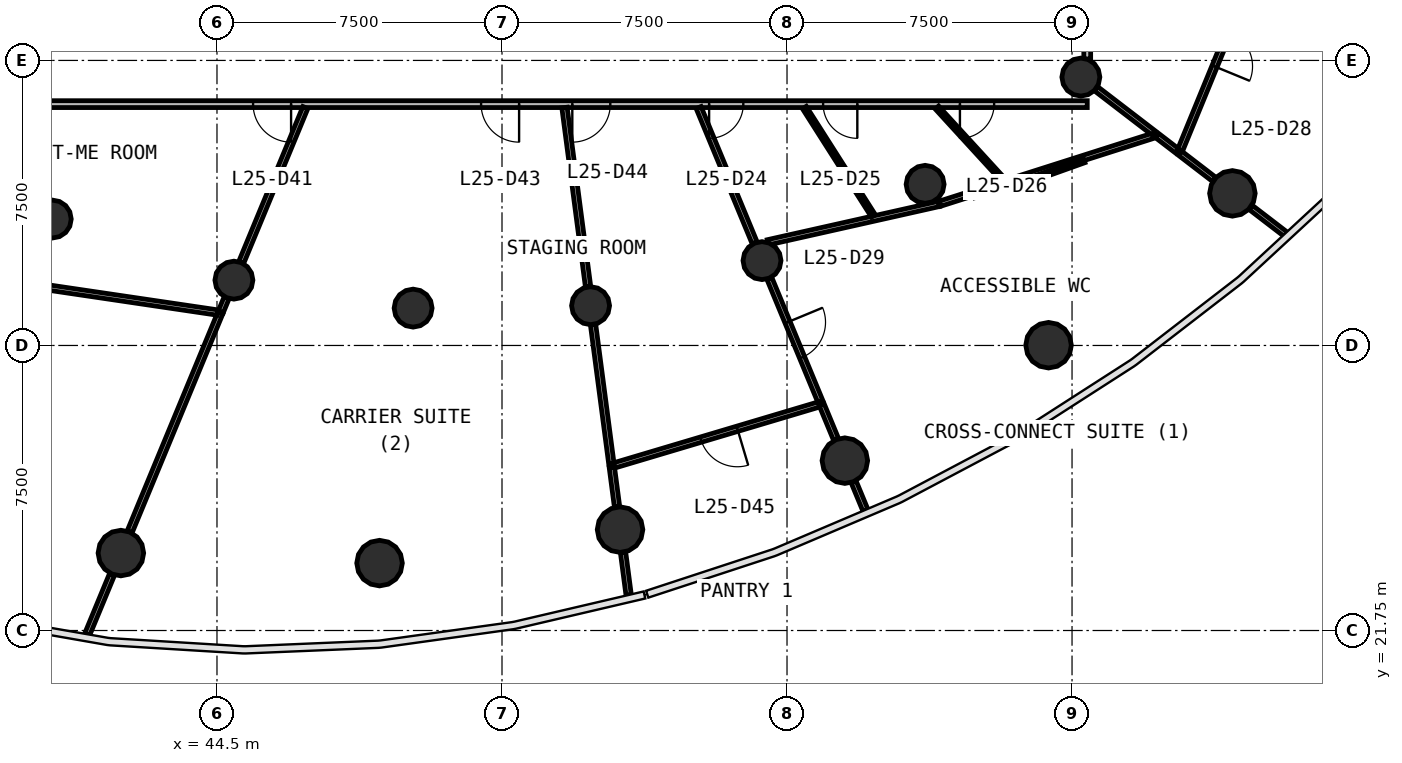
"""IFC4 building model, lengths in metres.
Left out: names, types, materials, properties, quantities, classifications, styles, units other than length and angle.
Written with IfcOpenShell. Run it as: python <this file> out.ifc"""

import sys

from ifc_helpers import new_model, si_unit, direction, frame, frame_2d, origin, origin_2d, place, context, subcontext, project, spatial, rectangle, circle, extrude, source, transform, mapped, element, fill, save


model = new_model("IFC4")
c1 = context("Model", 3, precision=1e-05, world=origin(), true_north=direction((0.0, 1.0)))
c2 = subcontext(c1, "Body", "Model", "MODEL_VIEW")
j1 = project(units=[si_unit("LENGTHUNIT", "METRE"), si_unit("PLANEANGLEUNIT", "RADIAN")], contexts=[c1])
p1 = place(None, origin())
s1 = spatial("IfcSite", under=j1, at=p1, CompositionType="ELEMENT")
p2 = place(p1, origin())
s2 = spatial("IfcBuilding", under=s1, at=p2, CompositionType="ELEMENT")
p3 = place(p2, frame((0.0, 0.0, 108.5)))
s3 = spatial("IfcBuildingStorey", under=s2, at=p3, CompositionType="ELEMENT", Elevation=108.5)
m1 = source(origin(), c2, "Body", "SweptSolid", [
    extrude(circle(Radius=0.6, at=origin_2d()), origin(), (0.0, 0.0, 1.0), 4.1),
])
for number, where, z_axis, x_axis in (
    (1, (41.971, 23.788, 0.0), (0.0, 0.0, 1.0), (1.0, 0.0, 0.0)),
    (2, (48.778, 23.523, 0.0), (0.0, 0.0, 1.0), (1.0, 0.0, 0.0)),
    (3, (55.106, 24.405, 0.0), (0.0, 0.0, 1.0), (1.0, 0.0, 0.0)),
    (4, (61.022, 26.219, 0.0), (0.0, 0.0, 1.0), (1.0, 0.0, 0.0)),
    (5, (66.382, 29.257, 0.0), (0.0, 0.0, 1.0), (1.0, 0.0, 0.0)),
    (6, (71.22, 33.252, 0.0), (0.0, 0.0, 1.0), (1.0, 0.0, 0.0)),
):
    element("IfcColumn", number, at=place(p3, frame(where, z_axis=z_axis, x_axis=x_axis)), inside=s3, PredefinedType="COLUMN", context=c2, shape_type="MappedRepresentation", body=[
        mapped(m1, transform((0.0, 0.0, 0.0), scale=1.0)),
    ])
m2 = source(origin(), c2, "Body", "SweptSolid", [
    extrude(circle(Radius=0.5, at=origin_2d()), origin(), (0.0, 0.0, 1.0), 4.1),
])
for number, where, z_axis, x_axis in (
    (7, (40.165, 32.576, 0.0), (0.0, 0.0, 1.0), (1.0, 0.0, 0.0)),
    (8, (44.945, 30.969, 0.0), (0.0, 0.0, 1.0), (1.0, 0.0, 0.0)),
    (9, (49.661, 30.233, 0.0), (0.0, 0.0, 1.0), (1.0, 0.0, 0.0)),
    (10, (54.331, 30.297, 0.0), (0.0, 0.0, 1.0), (1.0, 0.0, 0.0)),
    (11, (58.842, 31.482, 0.0), (0.0, 0.0, 1.0), (1.0, 0.0, 0.0)),
    (12, (63.134, 33.49, 0.0), (0.0, 0.0, 1.0), (1.0, 0.0, 0.0)),
    (13, (67.232, 36.312, 0.0), (0.0, 0.0, 1.0), (1.0, 0.0, 0.0)),
):
    element("IfcColumn", number, at=place(p3, frame(where, z_axis=z_axis, x_axis=x_axis)), inside=s3, PredefinedType="COLUMN", context=c2, shape_type="MappedRepresentation", body=[
        mapped(m2, transform((0.0, 0.0, 0.0), scale=1.0)),
    ])
p4 = place(p3, frame((67.4, 35.6, 0.0), z_axis=(0.0, 0.0, 1.0), x_axis=(-1.0, 0.0, 0.0)))
e14 = element("IfcWall", 14, at=p4, inside=s3, PredefinedType="PARTITIONING", context=c2, shape_type="SweptSolid", body=[
    extrude(rectangle(XDim=30.8, YDim=0.18, at=frame_2d((15.4, 0.0))), origin(), (0.0, 0.0, 1.0), 2.9),
])
p5 = place(p4, frame((9.05, 0.0, 0.0)))
e15 = element("IfcOpeningElement", 15, at=p5, cuts=e14, PredefinedType="OPENING", context=c2, shape_type="SweptSolid", body=[
    extrude(rectangle(XDim=0.9, YDim=2.1, at=frame_2d((0.45, 1.05))), frame((0.0, 0.1, 0.0), z_axis=(0.0, -1.0, 0.0), x_axis=(1.0, 0.0, 0.0)), (0.0, 0.0, 1.0), 0.2),
])
p6 = place(p4, frame((6.05, 0.0, 0.0)))
e16 = element("IfcOpeningElement", 16, at=p6, cuts=e14, PredefinedType="OPENING", context=c2, shape_type="SweptSolid", body=[
    extrude(rectangle(XDim=0.9, YDim=2.1, at=frame_2d((0.45, 1.05))), frame((0.0, 0.1, 0.0), z_axis=(0.0, -1.0, 0.0), x_axis=(1.0, 0.0, 0.0)), (0.0, 0.0, 1.0), 0.2),
])
p7 = place(p4, frame((2.45, 0.0, 0.0)))
e17 = element("IfcOpeningElement", 17, at=p7, cuts=e14, PredefinedType="OPENING", context=c2, shape_type="SweptSolid", body=[
    extrude(rectangle(XDim=0.9, YDim=2.1, at=frame_2d((0.45, 1.05))), frame((0.0, 0.1, 0.0), z_axis=(0.0, -1.0, 0.0), x_axis=(1.0, 0.0, 0.0)), (0.0, 0.0, 1.0), 0.2),
])
p8 = place(p4, frame((20.95, 0.0, 0.0)))
e18 = element("IfcOpeningElement", 18, at=p8, cuts=e14, PredefinedType="OPENING", context=c2, shape_type="SweptSolid", body=[
    extrude(rectangle(XDim=1.0, YDim=2.1, at=frame_2d((0.5, 1.05))), frame((0.0, 0.1, 0.0), z_axis=(0.0, -1.0, 0.0), x_axis=(1.0, 0.0, 0.0)), (0.0, 0.0, 1.0), 0.2),
])
p9 = place(p4, frame((14.95, 0.0, 0.0)))
e19 = element("IfcOpeningElement", 19, at=p9, cuts=e14, PredefinedType="OPENING", context=c2, shape_type="SweptSolid", body=[
    extrude(rectangle(XDim=1.0, YDim=2.1, at=frame_2d((0.5, 1.05))), frame((0.0, 0.1, 0.0), z_axis=(0.0, -1.0, 0.0), x_axis=(1.0, 0.0, 0.0)), (0.0, 0.0, 1.0), 0.2),
])
p10 = place(p4, frame((12.55, 0.0, 0.0)))
e20 = element("IfcOpeningElement", 20, at=p10, cuts=e14, PredefinedType="OPENING", context=c2, shape_type="SweptSolid", body=[
    extrude(rectangle(XDim=1.0, YDim=2.1, at=frame_2d((0.5, 1.05))), frame((0.0, 0.1, 0.0), z_axis=(0.0, -1.0, 0.0), x_axis=(1.0, 0.0, 0.0)), (0.0, 0.0, 1.0), 0.2),
])
p11 = place(p3, frame((67.4, 60.37, 0.0), z_axis=(0.0, 0.0, 1.0), x_axis=(0.0, -1.0, 0.0)))
e21 = element("IfcWall", 21, at=p11, inside=s3, PredefinedType="PARTITIONING", context=c2, shape_type="SweptSolid", body=[
    extrude(rectangle(XDim=23.583, YDim=0.18, at=frame_2d((11.791, 0.0))), origin(), (0.0, 0.0, 1.0), 2.9),
])
p12 = place(p11, frame((14.732, 0.0, 0.0)))
e22 = element("IfcOpeningElement", 22, at=p12, cuts=e21, PredefinedType="OPENING", context=c2, shape_type="SweptSolid", body=[
    extrude(rectangle(XDim=1.0, YDim=2.1, at=frame_2d((0.5, 1.05))), frame((0.0, 0.1, 0.0), z_axis=(0.0, -1.0, 0.0), x_axis=(1.0, 0.0, 0.0)), (0.0, 0.0, 1.0), 0.2),
])
p13 = place(p11, frame((11.333, 0.0, 0.0)))
e23 = element("IfcOpeningElement", 23, at=p13, cuts=e21, PredefinedType="OPENING", context=c2, shape_type="SweptSolid", body=[
    extrude(rectangle(XDim=1.0, YDim=2.1, at=frame_2d((0.5, 1.05))), frame((0.0, 0.1, 0.0), z_axis=(0.0, -1.0, 0.0), x_axis=(1.0, 0.0, 0.0)), (0.0, 0.0, 1.0), 0.2),
])
p14 = place(p11, frame((4.532, 0.0, 0.0)))
e24 = element("IfcOpeningElement", 24, at=p14, cuts=e21, PredefinedType="OPENING", context=c2, shape_type="SweptSolid", body=[
    extrude(rectangle(XDim=1.0, YDim=2.1, at=frame_2d((0.5, 1.05))), frame((0.0, 0.1, 0.0), z_axis=(0.0, -1.0, 0.0), x_axis=(1.0, 0.0, 0.0)), (0.0, 0.0, 1.0), 0.2),
])
p15 = place(p3, frame((44.588, 30.106, 0.0), z_axis=(0.0, 0.0, 1.0), x_axis=(-0.382687319502, -0.923877922397, 0.0)))
e25 = element("IfcWall", 25, at=p15, inside=s3, PredefinedType="PARTITIONING", context=c2, shape_type="SweptSolid", body=[
    extrude(rectangle(XDim=6.234, YDim=0.14, at=frame_2d((3.117, 0.0))), origin(), (0.0, 0.0, 1.0), 2.9),
])
p16 = place(p3, frame((63.525, 32.98, 0.0), z_axis=(0.0, 0.0, 1.0), x_axis=(0.952796236259, 0.303610494172, 0.0)))
e26 = element("IfcWall", 26, at=p16, inside=s3, PredefinedType="PARTITIONING", context=c2, shape_type="SweptSolid", body=[
    extrude(rectangle(XDim=5.969, YDim=0.14, at=frame_2d((2.984, 0.0))), origin(), (0.0, 0.0, 1.0), 2.9),
])
p17 = place(p3, frame((72.028, 39.704, 0.0), z_axis=(0.0, 0.0, 1.0), x_axis=(-0.380042060719, -0.92496920602, 0.0)))
e27 = element("IfcWall", 27, at=p17, inside=s3, PredefinedType="PARTITIONING", context=c2, shape_type="SweptSolid", body=[
    extrude(rectangle(XDim=5.813, YDim=0.14, at=frame_2d((2.907, 0.0))), origin(), (0.0, 0.0, 1.0), 2.9),
])
p18 = place(p17, frame((2.363, 0.0, 0.0)))
e28 = element("IfcOpeningElement", 28, at=p18, cuts=e27, PredefinedType="OPENING", context=c2, shape_type="SweptSolid", body=[
    extrude(rectangle(XDim=1.0, YDim=2.1, at=frame_2d((0.5, 1.05))), frame((0.0, 0.08, 0.0), z_axis=(0.0, -1.0, 0.0), x_axis=(1.0, 0.0, 0.0)), (0.0, 0.0, 1.0), 0.16),
])
p19 = place(p3, frame((60.402, 27.716, 0.0), z_axis=(0.0, 0.0, 1.0), x_axis=(-0.958396549516, -0.285440105584, 0.0)))
e29 = element("IfcWall", 29, at=p19, inside=s3, PredefinedType="PARTITIONING", context=c2, shape_type="SweptSolid", body=[
    extrude(rectangle(XDim=5.755, YDim=0.14, at=frame_2d((2.877, 0.0))), origin(), (0.0, 0.0, 1.0), 2.9),
])
p20 = place(p19, frame((2.304, 0.0, 0.0)))
e30 = element("IfcOpeningElement", 30, at=p20, cuts=e29, PredefinedType="OPENING", context=c2, shape_type="SweptSolid", body=[
    extrude(rectangle(XDim=1.0, YDim=2.1, at=frame_2d((0.5, 1.05))), frame((0.0, 0.08, 0.0), z_axis=(0.0, -1.0, 0.0), x_axis=(1.0, 0.0, 0.0)), (0.0, 0.0, 1.0), 0.16),
])
p21 = place(p3, frame((38.943, 30.94, 0.0), z_axis=(0.0, 0.0, 1.0), x_axis=(0.98924251215, -0.146284832283, 0.0)))
e31 = element("IfcWall", 31, at=p21, inside=s3, PredefinedType="PARTITIONING", context=c2, shape_type="SweptSolid", body=[
    extrude(rectangle(XDim=5.634, YDim=0.14, at=frame_2d((2.817, 0.0))), origin(), (0.0, 0.0, 1.0), 2.9),
])
p22 = place(p3, frame((53.644, 35.51, 0.0), z_axis=(0.0, 0.0, 1.0), x_axis=(0.130548834981, -0.991441880135, 0.0)))
e32 = element("IfcWall", 32, at=p22, inside=s3, PredefinedType="PARTITIONING", context=c2, shape_type="SweptSolid", body=[
    extrude(rectangle(XDim=4.754, YDim=0.14, at=frame_2d((2.377, 0.0))), origin(), (0.0, 0.0, 1.0), 2.9),
])
p23 = place(p3, frame((58.994, 31.964, 0.0), z_axis=(0.0, 0.0, 1.0), x_axis=(0.975726638185, 0.218992071856, 0.0)))
e33 = element("IfcWall", 33, at=p23, inside=s3, PredefinedType="PARTITIONING", context=c2, shape_type="SweptSolid", body=[
    extrude(rectangle(XDim=4.613, YDim=0.14, at=frame_2d((2.307, 0.0))), origin(), (0.0, 0.0, 1.0), 2.9),
])
p24 = place(p3, frame((46.826, 35.51, 0.0), z_axis=(0.0, 0.0, 1.0), x_axis=(-0.382672831764, -0.923883923353, 0.0)))
e34 = element("IfcWall", 34, at=p24, inside=s3, PredefinedType="PARTITIONING", context=c2, shape_type="SweptSolid", body=[
    extrude(rectangle(XDim=4.41, YDim=0.14, at=frame_2d((2.205, 0.0))), origin(), (0.0, 0.0, 1.0), 2.9),
])
p25 = place(p3, frame((57.174, 35.51, 0.0), z_axis=(0.0, 0.0, 1.0), x_axis=(0.382644558062, -0.923895633817, 0.0)))
e35 = element("IfcWall", 35, at=p25, inside=s3, PredefinedType="PARTITIONING", context=c2, shape_type="SweptSolid", body=[
    extrude(rectangle(XDim=3.854, YDim=0.14, at=frame_2d((1.927, 0.0))), origin(), (0.0, 0.0, 1.0), 2.9),
])
p26 = place(p3, frame((54.396, 29.797, 0.0), z_axis=(0.0, 0.0, 1.0), x_axis=(0.13054879449, -0.991441885466, 0.0)))
e36 = element("IfcWall", 36, at=p26, inside=s3, PredefinedType="PARTITIONING", context=c2, shape_type="SweptSolid", body=[
    extrude(rectangle(XDim=3.684, YDim=0.14, at=frame_2d((1.842, 0.0))), origin(), (0.0, 0.0, 1.0), 2.9),
])
p27 = place(p3, frame((59.035, 31.016, 0.0), z_axis=(0.0, 0.0, 1.0), x_axis=(0.382713118167, -0.923867235691, 0.0)))
e37 = element("IfcWall", 37, at=p27, inside=s3, PredefinedType="PARTITIONING", context=c2, shape_type="SweptSolid", body=[
    extrude(rectangle(XDim=3.501, YDim=0.14, at=frame_2d((1.75, 0.0))), origin(), (0.0, 0.0, 1.0), 2.9),
])
p28 = place(p27, frame((1.25, 0.0, 0.0)))
e38 = element("IfcOpeningElement", 38, at=p28, cuts=e37, PredefinedType="OPENING", context=c2, shape_type="SweptSolid", body=[
    extrude(rectangle(XDim=1.0, YDim=2.1, at=frame_2d((0.5, 1.05))), frame((0.0, 0.08, 0.0), z_axis=(0.0, -1.0, 0.0), x_axis=(1.0, 0.0, 0.0)), (0.0, 0.0, 1.0), 0.16),
])
p29 = place(p3, frame((67.633, 36.005, 0.0), z_axis=(0.0, 0.0, 1.0), x_axis=(0.79330932609, -0.608818785139, 0.0)))
e39 = element("IfcWall", 39, at=p29, inside=s3, PredefinedType="PARTITIONING", context=c2, shape_type="SweptSolid", body=[
    extrude(rectangle(XDim=1.906, YDim=0.14, at=frame_2d((0.953, 0.0))), origin(), (0.0, 0.0, 1.0), 2.9),
])
p30 = place(p3, frame((41.74, 23.229, 0.0), z_axis=(0.0, 0.0, 1.0), x_axis=(-0.382769756697, -0.923843771077, 0.0)))
e40 = element("IfcWall", 40, at=p30, inside=s3, PredefinedType="PARTITIONING", context=c2, shape_type="SweptSolid", body=[
    extrude(rectangle(XDim=1.719, YDim=0.14, at=frame_2d((0.86, 0.0))), origin(), (0.0, 0.0, 1.0), 2.9),
])
p31 = place(p3, frame((71.699, 32.884, 0.0), z_axis=(0.0, 0.0, 1.0), x_axis=(0.793332880396, -0.608788091935, 0.0)))
e41 = element("IfcWall", 41, at=p31, inside=s3, PredefinedType="PARTITIONING", context=c2, shape_type="SweptSolid", body=[
    extrude(rectangle(XDim=1.164, YDim=0.14, at=frame_2d((0.582, 0.0))), origin(), (0.0, 0.0, 1.0), 2.9),
])
for number, where, z_axis, x_axis in (
    (42, (69.843, 34.309, 0.0), (0.0, 0.0, 1.0), (0.793, -0.609, 0.0)),
    (43, (55.185, 23.805, 0.0), (0.0, 0.0, 1.0), (0.131, -0.991, 0.0)),
):
    element("IfcWall", number, at=place(p3, frame(where, z_axis=z_axis, x_axis=x_axis)), inside=s3, PredefinedType="PARTITIONING", context=c2, shape_type="SweptSolid", body=[
        extrude(rectangle(XDim=1.131, YDim=0.14, at=frame_2d((0.566, 0.0))), origin(), (0.0, 0.0, 1.0), 2.9),
    ])
p32 = place(p3, frame((54.891, 26.044, 0.0), z_axis=(0.0, 0.0, 1.0), x_axis=(0.130562877322, -0.991440030998, 0.0)))
e44 = element("IfcWall", 44, at=p32, inside=s3, PredefinedType="PARTITIONING", context=c2, shape_type="SweptSolid", body=[
    extrude(rectangle(XDim=1.049, YDim=0.14, at=frame_2d((0.524, 0.0))), origin(), (0.0, 0.0, 1.0), 2.9),
])
p33 = place(p3, frame((60.413, 27.689, 0.0), z_axis=(0.0, 0.0, 1.0), x_axis=(0.382767514508, -0.923844700065, 0.0)))
e45 = element("IfcWall", 45, at=p33, inside=s3, PredefinedType="PARTITIONING", context=c2, shape_type="SweptSolid", body=[
    extrude(rectangle(XDim=0.985, YDim=0.14, at=frame_2d((0.493, 0.0))), origin(), (0.0, 0.0, 1.0), 2.9),
])
p34 = place(p3, frame((61.253, 25.66, 0.0), z_axis=(0.0, 0.0, 1.0), x_axis=(0.382520140646, -0.923947153251, 0.0)))
e46 = element("IfcWall", 46, at=p34, inside=s3, PredefinedType="PARTITIONING", context=c2, shape_type="SweptSolid", body=[
    extrude(rectangle(XDim=0.811, YDim=0.14, at=frame_2d((0.406, 0.0))), origin(), (0.0, 0.0, 1.0), 2.9),
])
p35 = place(p3, frame((69.236, 34.774, 0.0), z_axis=(0.0, 0.0, 1.0), x_axis=(0.793363129336, -0.608748671465, 0.0)))
e47 = element("IfcWall", 47, at=p35, inside=s3, PredefinedType="PARTITIONING", context=c2, shape_type="SweptSolid", body=[
    extrude(rectangle(XDim=0.663, YDim=0.14, at=frame_2d((0.331, 0.0))), origin(), (0.0, 0.0, 1.0), 2.9),
])
p36 = place(p3, frame((44.752, 30.502, 0.0), z_axis=(0.0, 0.0, 1.0), x_axis=(-0.382441868588, -0.923979554509, 0.0)))
e48 = element("IfcWall", 48, at=p36, inside=s3, PredefinedType="PARTITIONING", context=c2, shape_type="SweptSolid", body=[
    extrude(rectangle(XDim=0.399, YDim=0.14, at=frame_2d((0.199, 0.0))), origin(), (0.0, 0.0, 1.0), 2.9),
])
p37 = place(p3, frame((65.363, 33.417, 0.0), z_axis=(0.0, 0.0, 1.0), x_axis=(0.941622213284, 0.336671364166, 0.0)))
e49 = element("IfcWall", 49, at=p37, inside=s3, PredefinedType="PARTITIONING", context=c2, shape_type="SweptSolid", body=[
    extrude(rectangle(XDim=2.078, YDim=0.12, at=frame_2d((1.039, 0.0))), origin(), (0.0, 0.0, 1.0), 2.9),
])
p38 = place(p3, frame((59.957, 35.51, 0.0), z_axis=(0.0, 0.0, 1.0), x_axis=(0.53729604105, -0.843393718421, 0.0)))
e50 = element("IfcWall", 50, at=p38, inside=s3, PredefinedType="PARTITIONING", context=c2, shape_type="SweptSolid", body=[
    extrude(rectangle(XDim=3.38, YDim=0.12, at=frame_2d((1.69, 0.0))), origin(), (0.0, 0.0, 1.0), 2.9),
])
p39 = place(p3, frame((63.445, 35.51, 0.0), z_axis=(0.0, 0.0, 1.0), x_axis=(0.675550604447, -0.737313624471, 0.0)))
e51 = element("IfcWall", 51, at=p39, inside=s3, PredefinedType="PARTITIONING", context=c2, shape_type="SweptSolid", body=[
    extrude(rectangle(XDim=2.605, YDim=0.12, at=frame_2d((1.302, 0.0))), origin(), (0.0, 0.0, 1.0), 2.9),
])
p40 = place(p3, frame((64.429, 33.195, 0.0), z_axis=(0.0, 0.0, 1.0), x_axis=(0.972960885816, 0.230969943221, 0.0)))
e52 = element("IfcWall", 52, at=p40, inside=s3, PredefinedType="PARTITIONING", context=c2, shape_type="SweptSolid", body=[
    extrude(rectangle(XDim=0.93, YDim=0.12, at=frame_2d((0.465, 0.0))), origin(), (0.0, 0.0, 1.0), 2.9),
])
m3 = source(origin(), c2, "Body", "SweptSolid", [
    extrude(rectangle(XDim=0.9, YDim=2.1, at=frame_2d((0.45, 1.05))), frame((0.0, 0.025, 0.0), z_axis=(0.0, -1.0, 0.0), x_axis=(1.0, 0.0, 0.0)), (0.0, 0.0, 1.0), 0.05),
])
p41 = place(p5, origin())
e53 = element("IfcDoor", 53, at=p41, inside=s3, OperationType="SINGLE_SWING_RIGHT", PredefinedType="DOOR", context=c2, shape_type="MappedRepresentation", body=[
    mapped(m3, transform((0.0, 0.0, 0.0), scale=1.0)),
])
fill(e15, e53)
p42 = place(p6, origin())
e54 = element("IfcDoor", 54, at=p42, inside=s3, OperationType="SINGLE_SWING_LEFT", PredefinedType="DOOR", context=c2, shape_type="MappedRepresentation", body=[
    mapped(m3, transform((0.0, 0.0, 0.0), scale=1.0)),
])
fill(e16, e54)
p43 = place(p7, origin())
e55 = element("IfcDoor", 55, at=p43, inside=s3, OperationType="SINGLE_SWING_RIGHT", PredefinedType="DOOR", context=c2, shape_type="MappedRepresentation", body=[
    mapped(m3, transform((0.0, 0.0, 0.0), scale=1.0)),
])
fill(e17, e55)
m4 = source(origin(), c2, "Body", "SweptSolid", [
    extrude(rectangle(XDim=1.0, YDim=2.1, at=frame_2d((0.5, 1.05))), frame((0.0, 0.025, 0.0), z_axis=(0.0, -1.0, 0.0), x_axis=(1.0, 0.0, 0.0)), (0.0, 0.0, 1.0), 0.05),
])
p44 = place(p18, origin())
e56 = element("IfcDoor", 56, at=p44, inside=s3, OperationType="SINGLE_SWING_RIGHT", PredefinedType="DOOR", context=c2, shape_type="MappedRepresentation", body=[
    mapped(m4, transform((0.0, 0.0, 0.0), scale=1.0)),
])
fill(e28, e56)
p45 = place(p28, origin())
e57 = element("IfcDoor", 57, at=p45, inside=s3, OperationType="SINGLE_SWING_LEFT", PredefinedType="DOOR", context=c2, shape_type="MappedRepresentation", body=[
    mapped(m4, transform((0.0, 0.0, 0.0), scale=1.0)),
])
fill(e38, e57)
p46 = place(p8, origin())
e58 = element("IfcDoor", 58, at=p46, inside=s3, OperationType="SINGLE_SWING_LEFT", PredefinedType="DOOR", context=c2, shape_type="MappedRepresentation", body=[
    mapped(m4, transform((0.0, 0.0, 0.0), scale=1.0)),
])
fill(e18, e58)
p47 = place(p9, origin())
e59 = element("IfcDoor", 59, at=p47, inside=s3, OperationType="SINGLE_SWING_LEFT", PredefinedType="DOOR", context=c2, shape_type="MappedRepresentation", body=[
    mapped(m4, transform((0.0, 0.0, 0.0), scale=1.0)),
])
fill(e19, e59)
p48 = place(p10, origin())
e60 = element("IfcDoor", 60, at=p48, inside=s3, OperationType="SINGLE_SWING_RIGHT", PredefinedType="DOOR", context=c2, shape_type="MappedRepresentation", body=[
    mapped(m4, transform((0.0, 0.0, 0.0), scale=1.0)),
])
fill(e20, e60)
p49 = place(p20, origin())
e61 = element("IfcDoor", 61, at=p49, inside=s3, OperationType="SINGLE_SWING_LEFT", PredefinedType="DOOR", context=c2, shape_type="MappedRepresentation", body=[
    mapped(m4, transform((0.0, 0.0, 0.0), scale=1.0)),
])
fill(e30, e61)
save(model, sys.argv[1])
